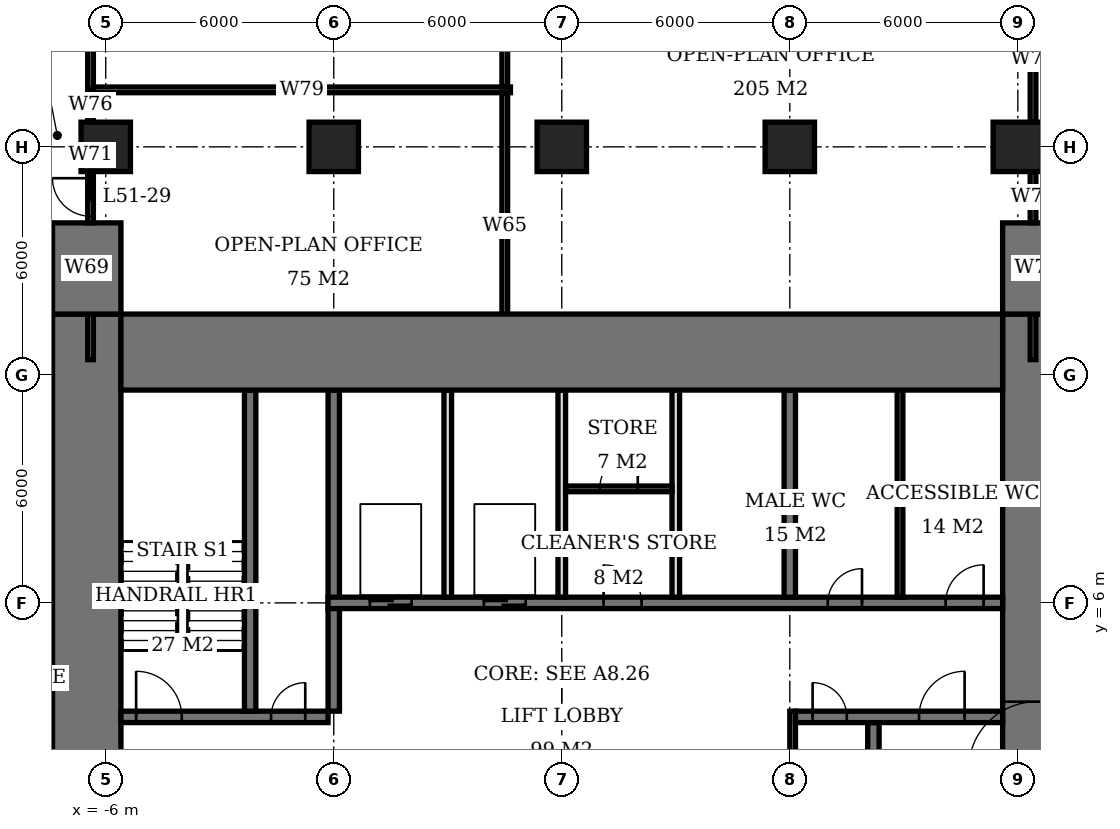
"""IFC4 building model, lengths in metres.
Left out: names, types, materials, properties, quantities, classifications, styles, units other than length and angle.
Written with IfcOpenShell. Run it as: python <this file> out.ifc"""

import sys

from ifc_helpers import new_model, si_unit, direction, frame, frame_2d, origin, origin_2d, place, context, subcontext, project, spatial, rectangle, extrude, element, fill, save


model = new_model("IFC4")
c1 = context("Model", 3, precision=1e-05, world=origin(), true_north=direction((0.0, 1.0)))
c2 = subcontext(c1, "Body", "Model", "MODEL_VIEW")
j1 = project(units=[si_unit("LENGTHUNIT", "METRE"), si_unit("PLANEANGLEUNIT", "RADIAN")], contexts=[c1])
p1 = place(None, origin())
s1 = spatial("IfcSite", under=j1, at=p1, CompositionType="ELEMENT")
p2 = place(p1, origin())
s2 = spatial("IfcBuilding", under=s1, at=p2, CompositionType="ELEMENT")
p3 = place(p2, frame((0.0, 0.0, 208.4)))
s3 = spatial("IfcBuildingStorey", under=s2, at=p3, CompositionType="ELEMENT", Elevation=208.4)
for number, where, z_axis, x_axis in (
    (1, (-6.0, 18.0, 0.0), (0.0, 0.0, 1.0), (1.0, 0.0, 0.0)),
    (2, (0.0, 18.0, 0.0), (0.0, 0.0, 1.0), (1.0, 0.0, 0.0)),
    (3, (6.0, 18.0, 0.0), (0.0, 0.0, 1.0), (1.0, 0.0, 0.0)),
    (4, (12.0, 18.0, 0.0), (0.0, 0.0, 1.0), (1.0, 0.0, 0.0)),
    (5, (18.0, 18.0, 0.0), (0.0, 0.0, 1.0), (1.0, 0.0, 0.0)),
):
    element("IfcColumn", number, at=place(p3, frame(where, z_axis=z_axis, x_axis=x_axis)), inside=s3, PredefinedType="COLUMN", context=c2, shape_type="SweptSolid", body=[
        extrude(rectangle(XDim=1.3, YDim=1.3, at=origin_2d()), origin(), (0.0, 0.0, 1.0), 3.9),
    ])
p4 = place(p3, frame((-5.6, 12.6, 0.0), z_axis=(0.0, 0.0, 1.0), x_axis=(1.0, 0.0, 0.0)))
e6 = element("IfcWall", 6, at=p4, inside=s3, PredefinedType="SHEAR", context=c2, shape_type="SweptSolid", body=[
    extrude(rectangle(XDim=23.2, YDim=2.0, at=frame_2d((11.6, 0.0))), origin(), (0.0, 0.0, 1.0), 3.9),
])
p5 = place(p3, frame((-6.5, -7.6, 0.0), z_axis=(0.0, 0.0, 1.0), x_axis=(0.0, 1.0, 0.0)))
e7 = element("IfcWall", 7, at=p5, inside=s3, PredefinedType="SHEAR", context=c2, shape_type="SweptSolid", body=[
    extrude(rectangle(XDim=21.2, YDim=1.8, at=frame_2d((10.6, 0.0))), origin(), (0.0, 0.0, 1.0), 3.9),
])
p6 = place(p5, frame((7.8, 0.0, 0.0)))
e8 = element("IfcOpeningElement", 8, at=p6, cuts=e7, PredefinedType="OPENING", context=c2, shape_type="SweptSolid", body=[
    extrude(rectangle(XDim=1.8, YDim=2.4, at=frame_2d((0.9, 1.2))), frame((0.0, 0.91, 0.0), z_axis=(0.0, -1.0, 0.0), x_axis=(1.0, 0.0, 0.0)), (0.0, 0.0, 1.0), 1.82),
])
p7 = place(p3, frame((18.5, -7.6, 0.0), z_axis=(0.0, 0.0, 1.0), x_axis=(0.0, 1.0, 0.0)))
e9 = element("IfcWall", 9, at=p7, inside=s3, PredefinedType="SHEAR", context=c2, shape_type="SweptSolid", body=[
    extrude(rectangle(XDim=21.2, YDim=1.8, at=frame_2d((10.6, 0.0))), origin(), (0.0, 0.0, 1.0), 3.9),
])
p8 = place(p7, frame((9.2, 0.0, 0.0)))
e10 = element("IfcOpeningElement", 10, at=p8, cuts=e9, PredefinedType="OPENING", context=c2, shape_type="SweptSolid", body=[
    extrude(rectangle(XDim=1.8, YDim=2.4, at=frame_2d((0.9, 1.2))), frame((0.0, 0.91, 0.0), z_axis=(0.0, -1.0, 0.0), x_axis=(1.0, 0.0, 0.0)), (0.0, 0.0, 1.0), 1.82),
])
for number, where, z_axis, x_axis in (
    (11, (-6.5, 13.6, 0.0), (0.0, 0.0, 1.0), (0.0, 1.0, 0.0)),
    (12, (18.5, 13.6, 0.0), (0.0, 0.0, 1.0), (0.0, 1.0, 0.0)),
):
    element("IfcWall", number, at=place(p3, frame(where, z_axis=z_axis, x_axis=x_axis)), inside=s3, PredefinedType="SHEAR", context=c2, shape_type="SweptSolid", body=[
        extrude(rectangle(XDim=2.4, YDim=1.8, at=frame_2d((1.2, 0.0))), origin(), (0.0, 0.0, 1.0), 3.9),
    ])
p9 = place(p3, frame((-5.6, 3.0, 0.0), z_axis=(0.0, 0.0, 1.0), x_axis=(1.0, 0.0, 0.0)))
e13 = element("IfcWall", 13, at=p9, inside=s3, PredefinedType="SHEAR", context=c2, shape_type="SweptSolid", body=[
    extrude(rectangle(XDim=5.45, YDim=0.3, at=frame_2d((2.725, 0.0))), origin(), (0.0, 0.0, 1.0), 3.9),
])
p10 = place(p9, frame((0.4, 0.0, 0.0)))
e14 = element("IfcOpeningElement", 14, at=p10, cuts=e13, PredefinedType="OPENING", context=c2, shape_type="SweptSolid", body=[
    extrude(rectangle(XDim=1.2, YDim=2.1, at=frame_2d((0.6, 1.05))), frame((0.0, 0.16, 0.0), z_axis=(0.0, -1.0, 0.0), x_axis=(1.0, 0.0, 0.0)), (0.0, 0.0, 1.0), 0.32),
])
p11 = place(p9, frame((3.95, 0.0, 0.0)))
e15 = element("IfcOpeningElement", 15, at=p11, cuts=e13, PredefinedType="OPENING", context=c2, shape_type="SweptSolid", body=[
    extrude(rectangle(XDim=0.9, YDim=2.1, at=frame_2d((0.45, 1.05))), frame((0.0, 0.16, 0.0), z_axis=(0.0, -1.0, 0.0), x_axis=(1.0, 0.0, 0.0)), (0.0, 0.0, 1.0), 0.32),
])
p12 = place(p3, frame((12.15, 3.0, 0.0), z_axis=(0.0, 0.0, 1.0), x_axis=(1.0, 0.0, 0.0)))
e16 = element("IfcWall", 16, at=p12, inside=s3, PredefinedType="SHEAR", context=c2, shape_type="SweptSolid", body=[
    extrude(rectangle(XDim=5.45, YDim=0.3, at=frame_2d((2.725, 0.0))), origin(), (0.0, 0.0, 1.0), 3.9),
])
p13 = place(p12, frame((3.25, 0.0, 0.0)))
e17 = element("IfcOpeningElement", 17, at=p13, cuts=e16, PredefinedType="OPENING", context=c2, shape_type="SweptSolid", body=[
    extrude(rectangle(XDim=1.2, YDim=2.1, at=frame_2d((0.6, 1.05))), frame((0.0, 0.16, 0.0), z_axis=(0.0, -1.0, 0.0), x_axis=(1.0, 0.0, 0.0)), (0.0, 0.0, 1.0), 0.32),
])
p14 = place(p12, frame((0.45, 0.0, 0.0)))
e18 = element("IfcOpeningElement", 18, at=p14, cuts=e16, PredefinedType="OPENING", context=c2, shape_type="SweptSolid", body=[
    extrude(rectangle(XDim=0.9, YDim=2.1, at=frame_2d((0.45, 1.05))), frame((0.0, 0.16, 0.0), z_axis=(0.0, -1.0, 0.0), x_axis=(1.0, 0.0, 0.0)), (0.0, 0.0, 1.0), 0.32),
])
p15 = place(p3, frame((-0.15, 6.0, 0.0), z_axis=(0.0, 0.0, 1.0), x_axis=(1.0, 0.0, 0.0)))
e19 = element("IfcWall", 19, at=p15, inside=s3, PredefinedType="SHEAR", context=c2, shape_type="SweptSolid", body=[
    extrude(rectangle(XDim=17.75, YDim=0.3, at=frame_2d((8.875, 0.0))), origin(), (0.0, 0.0, 1.0), 3.9),
])
p16 = place(p15, frame((13.15, 0.0, 0.0)))
e20 = element("IfcOpeningElement", 20, at=p16, cuts=e19, PredefinedType="OPENING", context=c2, shape_type="SweptSolid", body=[
    extrude(rectangle(XDim=0.9, YDim=2.1, at=frame_2d((0.45, 1.05))), frame((0.0, 0.16, 0.0), z_axis=(0.0, -1.0, 0.0), x_axis=(1.0, 0.0, 0.0)), (0.0, 0.0, 1.0), 0.32),
])
p17 = place(p15, frame((16.25, 0.0, 0.0)))
e21 = element("IfcOpeningElement", 21, at=p17, cuts=e19, PredefinedType="OPENING", context=c2, shape_type="SweptSolid", body=[
    extrude(rectangle(XDim=1.0, YDim=2.1, at=frame_2d((0.5, 1.05))), frame((0.0, 0.16, 0.0), z_axis=(0.0, -1.0, 0.0), x_axis=(1.0, 0.0, 0.0)), (0.0, 0.0, 1.0), 0.32),
])
p18 = place(p15, frame((7.25, 0.0, 0.0)))
e22 = element("IfcOpeningElement", 22, at=p18, cuts=e19, PredefinedType="OPENING", context=c2, shape_type="SweptSolid", body=[
    extrude(rectangle(XDim=1.0, YDim=2.1, at=frame_2d((0.5, 1.05))), frame((0.0, 0.16, 0.0), z_axis=(0.0, -1.0, 0.0), x_axis=(1.0, 0.0, 0.0)), (0.0, 0.0, 1.0), 0.32),
])
p19 = place(p15, frame((1.1, 0.0, 0.0)))
e23 = element("IfcOpeningElement", 23, at=p19, cuts=e19, PredefinedType="OPENING", context=c2, shape_type="SweptSolid", body=[
    extrude(rectangle(XDim=1.1, YDim=2.1, at=frame_2d((0.55, 1.05))), frame((0.0, 0.16, 0.0), z_axis=(0.0, -1.0, 0.0), x_axis=(1.0, 0.0, 0.0)), (0.0, 0.0, 1.0), 0.32),
])
p20 = place(p15, frame((4.1, 0.0, 0.0)))
e24 = element("IfcOpeningElement", 24, at=p20, cuts=e19, PredefinedType="OPENING", context=c2, shape_type="SweptSolid", body=[
    extrude(rectangle(XDim=1.1, YDim=2.1, at=frame_2d((0.55, 1.05))), frame((0.0, 0.16, 0.0), z_axis=(0.0, -1.0, 0.0), x_axis=(1.0, 0.0, 0.0)), (0.0, 0.0, 1.0), 0.32),
])
p21 = place(p3, frame((0.0, 3.15, 0.0), z_axis=(0.0, 0.0, 1.0), x_axis=(0.0, 1.0, 0.0)))
e25 = element("IfcWall", 25, at=p21, inside=s3, PredefinedType="SHEAR", context=c2, shape_type="SweptSolid", body=[
    extrude(rectangle(XDim=8.45, YDim=0.3, at=frame_2d((4.225, 0.0))), origin(), (0.0, 0.0, 1.0), 3.9),
])
p22 = place(p3, frame((12.0, 6.15, 0.0), z_axis=(0.0, 0.0, 1.0), x_axis=(0.0, 1.0, 0.0)))
e26 = element("IfcWall", 26, at=p22, inside=s3, PredefinedType="SHEAR", context=c2, shape_type="SweptSolid", body=[
    extrude(rectangle(XDim=5.45, YDim=0.3, at=frame_2d((2.725, 0.0))), origin(), (0.0, 0.0, 1.0), 3.9),
])
for number, where, z_axis, x_axis in (
    (27, (-2.2, 3.15, 0.0), (0.0, 0.0, 1.0), (0.0, 1.0, 0.0)),
    (28, (14.2, -5.6, 0.0), (0.0, 0.0, 1.0), (0.0, 1.0, 0.0)),
):
    element("IfcWall", number, at=place(p3, frame(where, z_axis=z_axis, x_axis=x_axis)), inside=s3, PredefinedType="SHEAR", context=c2, shape_type="SweptSolid", body=[
        extrude(rectangle(XDim=8.45, YDim=0.3, at=frame_2d((4.225, 0.0))), origin(), (0.0, 0.0, 1.0), 3.9),
    ])
for number, where, z_axis, x_axis in (
    (29, (3.0, 6.15, 0.0), (0.0, 0.0, 1.0), (0.0, 1.0, 0.0)),
    (30, (6.0, 6.15, 0.0), (0.0, 0.0, 1.0), (0.0, 1.0, 0.0)),
    (31, (9.0, 6.15, 0.0), (0.0, 0.0, 1.0), (0.0, 1.0, 0.0)),
):
    element("IfcWall", number, at=place(p3, frame(where, z_axis=z_axis, x_axis=x_axis)), inside=s3, PredefinedType="SOLIDWALL", context=c2, shape_type="SweptSolid", body=[
        extrude(rectangle(XDim=5.45, YDim=0.2, at=frame_2d((2.725, 0.0))), origin(), (0.0, 0.0, 1.0), 3.9),
    ])
p23 = place(p3, frame((14.9, 6.15, 0.0), z_axis=(0.0, 0.0, 1.0), x_axis=(0.0, 1.0, 0.0)))
e32 = element("IfcWall", 32, at=p23, inside=s3, PredefinedType="PLUMBINGWALL", context=c2, shape_type="SweptSolid", body=[
    extrude(rectangle(XDim=5.45, YDim=0.15, at=frame_2d((2.725, 0.0))), origin(), (0.0, 0.0, 1.0), 3.65),
])
p24 = place(p3, frame((6.1, 9.0, 0.0), z_axis=(0.0, 0.0, 1.0), x_axis=(1.0, 0.0, 0.0)))
e33 = element("IfcWall", 33, at=p24, inside=s3, PredefinedType="PARTITIONING", context=c2, shape_type="SweptSolid", body=[
    extrude(rectangle(XDim=2.8, YDim=0.15, at=frame_2d((1.4, 0.0))), origin(), (0.0, 0.0, 1.0), 3.65),
])
p25 = place(p24, frame((0.9, 0.0, 0.0)))
e34 = element("IfcOpeningElement", 34, at=p25, cuts=e33, PredefinedType="OPENING", context=c2, shape_type="SweptSolid", body=[
    extrude(rectangle(XDim=1.0, YDim=2.1, at=frame_2d((0.5, 1.05))), frame((0.0, 0.085, 0.0), z_axis=(0.0, -1.0, 0.0), x_axis=(1.0, 0.0, 0.0)), (0.0, 0.0, 1.0), 0.17),
])
p26 = place(p3, frame((-6.4, 12.4, 0.0), z_axis=(0.0, 0.0, 1.0), x_axis=(0.0, 1.0, 0.0)))
e35 = element("IfcWall", 35, at=p26, inside=s3, PredefinedType="PARTITIONING", context=c2, shape_type="SweptSolid", body=[
    extrude(rectangle(XDim=1.2, YDim=0.15, at=frame_2d((0.6, 0.0))), origin(), (0.0, 0.0, 1.0), 3.65),
])
p27 = place(p3, frame((-6.4, 16.0, 0.0), z_axis=(0.0, 0.0, 1.0), x_axis=(0.0, 1.0, 0.0)))
e36 = element("IfcWall", 36, at=p27, inside=s3, PredefinedType="PARTITIONING", context=c2, shape_type="SweptSolid", body=[
    extrude(rectangle(XDim=1.35, YDim=0.15, at=frame_2d((0.675, 0.0))), origin(), (0.0, 0.0, 1.0), 3.65),
])
p28 = place(p27, frame((0.175, 0.0, 0.0)))
e37 = element("IfcOpeningElement", 37, at=p28, cuts=e36, PredefinedType="OPENING", context=c2, shape_type="SweptSolid", body=[
    extrude(rectangle(XDim=1.0, YDim=2.1, at=frame_2d((0.5, 1.05))), frame((0.0, 0.085, 0.0), z_axis=(0.0, -1.0, 0.0), x_axis=(1.0, 0.0, 0.0)), (0.0, 0.0, 1.0), 0.17),
])
p29 = place(p3, frame((-6.4, 18.65, 0.0), z_axis=(0.0, 0.0, 1.0), x_axis=(0.0, 1.0, 0.0)))
e38 = element("IfcWall", 38, at=p29, inside=s3, PredefinedType="PARTITIONING", context=c2, shape_type="SweptSolid", body=[
    extrude(rectangle(XDim=0.925, YDim=0.15, at=frame_2d((0.462, 0.0))), origin(), (0.0, 0.0, 1.0), 3.65),
])
p30 = place(p3, frame((-6.4, 19.5, 0.0), z_axis=(0.0, 0.0, 1.0), x_axis=(0.0, 1.0, 0.0)))
e39 = element("IfcWall", 39, at=p30, inside=s3, PredefinedType="PARTITIONING", context=c2, shape_type="SweptSolid", body=[
    extrude(rectangle(XDim=3.85, YDim=0.15, at=frame_2d((1.925, 0.0))), origin(), (0.0, 0.0, 1.0), 3.65),
])
p31 = place(p30, frame((2.55, 0.0, 0.0)))
e40 = element("IfcOpeningElement", 40, at=p31, cuts=e39, PredefinedType="OPENING", context=c2, shape_type="SweptSolid", body=[
    extrude(rectangle(XDim=1.0, YDim=2.1, at=frame_2d((0.5, 1.05))), frame((0.0, 0.085, 0.0), z_axis=(0.0, -1.0, 0.0), x_axis=(1.0, 0.0, 0.0)), (0.0, 0.0, 1.0), 0.17),
])
p32 = place(p3, frame((-6.325, 19.5, 0.0), z_axis=(0.0, 0.0, 1.0), x_axis=(1.0, 0.0, 0.0)))
e41 = element("IfcWall", 41, at=p32, inside=s3, PredefinedType="PARTITIONING", context=c2, shape_type="SweptSolid", body=[
    extrude(rectangle(XDim=10.975, YDim=0.15, at=frame_2d((5.487, 0.0))), origin(), (0.0, 0.0, 1.0), 3.65),
])
p33 = place(p3, frame((4.5, 12.4, 0.0), z_axis=(0.0, 0.0, 1.0), x_axis=(0.0, 1.0, 0.0)))
e42 = element("IfcWall", 42, at=p33, inside=s3, PredefinedType="PARTITIONING", context=c2, shape_type="SweptSolid", body=[
    extrude(rectangle(XDim=7.025, YDim=0.15, at=frame_2d((3.513, 0.0))), origin(), (0.0, 0.0, 1.0), 3.65),
])
p34 = place(p3, frame((4.5, 19.575, 0.0), z_axis=(0.0, 0.0, 1.0), x_axis=(0.0, 1.0, 0.0)))
e43 = element("IfcWall", 43, at=p34, inside=s3, PredefinedType="PARTITIONING", context=c2, shape_type="SweptSolid", body=[
    extrude(rectangle(XDim=4.95, YDim=0.15, at=frame_2d((2.475, 0.0))), origin(), (0.0, 0.0, 1.0), 3.65),
])
p35 = place(p3, frame((18.4, 12.4, 0.0), z_axis=(0.0, 0.0, 1.0), x_axis=(0.0, 1.0, 0.0)))
e44 = element("IfcWall", 44, at=p35, inside=s3, PredefinedType="PARTITIONING", context=c2, shape_type="SweptSolid", body=[
    extrude(rectangle(XDim=1.2, YDim=0.15, at=frame_2d((0.6, 0.0))), origin(), (0.0, 0.0, 1.0), 3.65),
])
p36 = place(p3, frame((18.4, 16.0, 0.0), z_axis=(0.0, 0.0, 1.0), x_axis=(0.0, 1.0, 0.0)))
e45 = element("IfcWall", 45, at=p36, inside=s3, PredefinedType="PARTITIONING", context=c2, shape_type="SweptSolid", body=[
    extrude(rectangle(XDim=1.35, YDim=0.15, at=frame_2d((0.675, 0.0))), origin(), (0.0, 0.0, 1.0), 3.65),
])
p37 = place(p3, frame((18.4, 18.65, 0.0), z_axis=(0.0, 0.0, 1.0), x_axis=(0.0, 1.0, 0.0)))
e46 = element("IfcWall", 46, at=p37, inside=s3, PredefinedType="PARTITIONING", context=c2, shape_type="SweptSolid", body=[
    extrude(rectangle(XDim=4.55, YDim=0.15, at=frame_2d((2.275, 0.0))), origin(), (0.0, 0.0, 1.0), 3.65),
])
p38 = place(p37, frame((2.205, 0.0, 0.0)))
e47 = element("IfcOpeningElement", 47, at=p38, cuts=e46, PredefinedType="OPENING", context=c2, shape_type="SweptSolid", body=[
    extrude(rectangle(XDim=1.0, YDim=2.1, at=frame_2d((0.5, 1.05))), frame((0.0, 0.085, 0.0), z_axis=(0.0, -1.0, 0.0), x_axis=(1.0, 0.0, 0.0)), (0.0, 0.0, 1.0), 0.17),
])
p39 = place(p3, frame((12.075, 0.15, 0.0), z_axis=(0.0, 0.0, 1.0), x_axis=(0.0, 1.0, 0.0)))
e48 = element("IfcWall", 48, at=p39, inside=s3, PredefinedType="PARTITIONING", context=c2, shape_type="SweptSolid", body=[
    extrude(rectangle(XDim=3.0, YDim=0.15, at=frame_2d((1.5, 0.0))), origin(), (0.0, 0.0, 1.0), 3.65),
])
p40 = place(p8, origin())
e49 = element("IfcDoor", 49, at=p40, inside=s3, OperationType="DOUBLE_DOOR_SINGLE_SWING", PredefinedType="DOOR", context=c2, shape_type="SweptSolid", body=[
    extrude(rectangle(XDim=1.8, YDim=2.4, at=frame_2d((0.9, 1.2))), frame((0.0, 0.025, 0.0), z_axis=(0.0, -1.0, 0.0), x_axis=(1.0, 0.0, 0.0)), (0.0, 0.0, 1.0), 0.05),
])
fill(e10, e49)
p41 = place(p10, origin())
e50 = element("IfcDoor", 50, at=p41, inside=s3, OperationType="SINGLE_SWING_LEFT", PredefinedType="DOOR", context=c2, shape_type="SweptSolid", body=[
    extrude(rectangle(XDim=1.2, YDim=2.1, at=frame_2d((0.6, 1.05))), frame((0.0, 0.025, 0.0), z_axis=(0.0, -1.0, 0.0), x_axis=(1.0, 0.0, 0.0)), (0.0, 0.0, 1.0), 0.05),
])
fill(e14, e50)
p42 = place(p11, origin())
e51 = element("IfcDoor", 51, at=p42, inside=s3, OperationType="SINGLE_SWING_RIGHT", PredefinedType="DOOR", context=c2, shape_type="SweptSolid", body=[
    extrude(rectangle(XDim=0.9, YDim=2.1, at=frame_2d((0.45, 1.05))), frame((0.0, 0.025, 0.0), z_axis=(0.0, -1.0, 0.0), x_axis=(1.0, 0.0, 0.0)), (0.0, 0.0, 1.0), 0.05),
])
fill(e15, e51)
p43 = place(p13, origin())
e52 = element("IfcDoor", 52, at=p43, inside=s3, OperationType="SINGLE_SWING_RIGHT", PredefinedType="DOOR", context=c2, shape_type="SweptSolid", body=[
    extrude(rectangle(XDim=1.2, YDim=2.1, at=frame_2d((0.6, 1.05))), frame((0.0, 0.025, 0.0), z_axis=(0.0, -1.0, 0.0), x_axis=(1.0, 0.0, 0.0)), (0.0, 0.0, 1.0), 0.05),
])
fill(e17, e52)
p44 = place(p14, origin())
e53 = element("IfcDoor", 53, at=p44, inside=s3, OperationType="SINGLE_SWING_LEFT", PredefinedType="DOOR", context=c2, shape_type="SweptSolid", body=[
    extrude(rectangle(XDim=0.9, YDim=2.1, at=frame_2d((0.45, 1.05))), frame((0.0, 0.025, 0.0), z_axis=(0.0, -1.0, 0.0), x_axis=(1.0, 0.0, 0.0)), (0.0, 0.0, 1.0), 0.05),
])
fill(e18, e53)
p45 = place(p16, origin())
e54 = element("IfcDoor", 54, at=p45, inside=s3, OperationType="SINGLE_SWING_RIGHT", PredefinedType="DOOR", context=c2, shape_type="SweptSolid", body=[
    extrude(rectangle(XDim=0.9, YDim=2.1, at=frame_2d((0.45, 1.05))), frame((0.0, 0.025, 0.0), z_axis=(0.0, -1.0, 0.0), x_axis=(1.0, 0.0, 0.0)), (0.0, 0.0, 1.0), 0.05),
])
fill(e20, e54)
p46 = place(p17, origin())
e55 = element("IfcDoor", 55, at=p46, inside=s3, OperationType="SINGLE_SWING_RIGHT", PredefinedType="DOOR", context=c2, shape_type="SweptSolid", body=[
    extrude(rectangle(XDim=1.0, YDim=2.1, at=frame_2d((0.5, 1.05))), frame((0.0, 0.025, 0.0), z_axis=(0.0, -1.0, 0.0), x_axis=(1.0, 0.0, 0.0)), (0.0, 0.0, 1.0), 0.05),
])
fill(e21, e55)
p47 = place(p25, origin())
e56 = element("IfcDoor", 56, at=p47, inside=s3, OperationType="SINGLE_SWING_RIGHT", PredefinedType="DOOR", context=c2, shape_type="SweptSolid", body=[
    extrude(rectangle(XDim=1.0, YDim=2.1, at=frame_2d((0.5, 1.05))), frame((0.0, 0.025, 0.0), z_axis=(0.0, -1.0, 0.0), x_axis=(1.0, 0.0, 0.0)), (0.0, 0.0, 1.0), 0.05),
])
fill(e34, e56)
p48 = place(p18, origin())
e57 = element("IfcDoor", 57, at=p48, inside=s3, OperationType="SINGLE_SWING_LEFT", PredefinedType="DOOR", context=c2, shape_type="SweptSolid", body=[
    extrude(rectangle(XDim=1.0, YDim=2.1, at=frame_2d((0.5, 1.05))), frame((0.0, 0.025, 0.0), z_axis=(0.0, -1.0, 0.0), x_axis=(1.0, 0.0, 0.0)), (0.0, 0.0, 1.0), 0.05),
])
fill(e22, e57)
p49 = place(p19, origin())
e58 = element("IfcDoor", 58, at=p49, inside=s3, OperationType="DOUBLE_DOOR_SLIDING", PredefinedType="USERDEFINED", context=c2, shape_type="SweptSolid", body=[
    extrude(rectangle(XDim=1.1, YDim=2.1, at=frame_2d((0.55, 1.05))), frame((0.0, 0.025, 0.0), z_axis=(0.0, -1.0, 0.0), x_axis=(1.0, 0.0, 0.0)), (0.0, 0.0, 1.0), 0.05),
])
fill(e23, e58)
p50 = place(p20, origin())
e59 = element("IfcDoor", 59, at=p50, inside=s3, OperationType="DOUBLE_DOOR_SLIDING", PredefinedType="USERDEFINED", context=c2, shape_type="SweptSolid", body=[
    extrude(rectangle(XDim=1.1, YDim=2.1, at=frame_2d((0.55, 1.05))), frame((0.0, 0.025, 0.0), z_axis=(0.0, -1.0, 0.0), x_axis=(1.0, 0.0, 0.0)), (0.0, 0.0, 1.0), 0.05),
])
fill(e24, e59)
p51 = place(p28, origin())
e60 = element("IfcDoor", 60, at=p51, inside=s3, OperationType="SINGLE_SWING_RIGHT", PredefinedType="DOOR", context=c2, shape_type="SweptSolid", body=[
    extrude(rectangle(XDim=1.0, YDim=2.1, at=frame_2d((0.5, 1.05))), frame((0.0, 0.025, 0.0), z_axis=(0.0, -1.0, 0.0), x_axis=(1.0, 0.0, 0.0)), (0.0, 0.0, 1.0), 0.05),
])
fill(e37, e60)
save(model, sys.argv[1])
